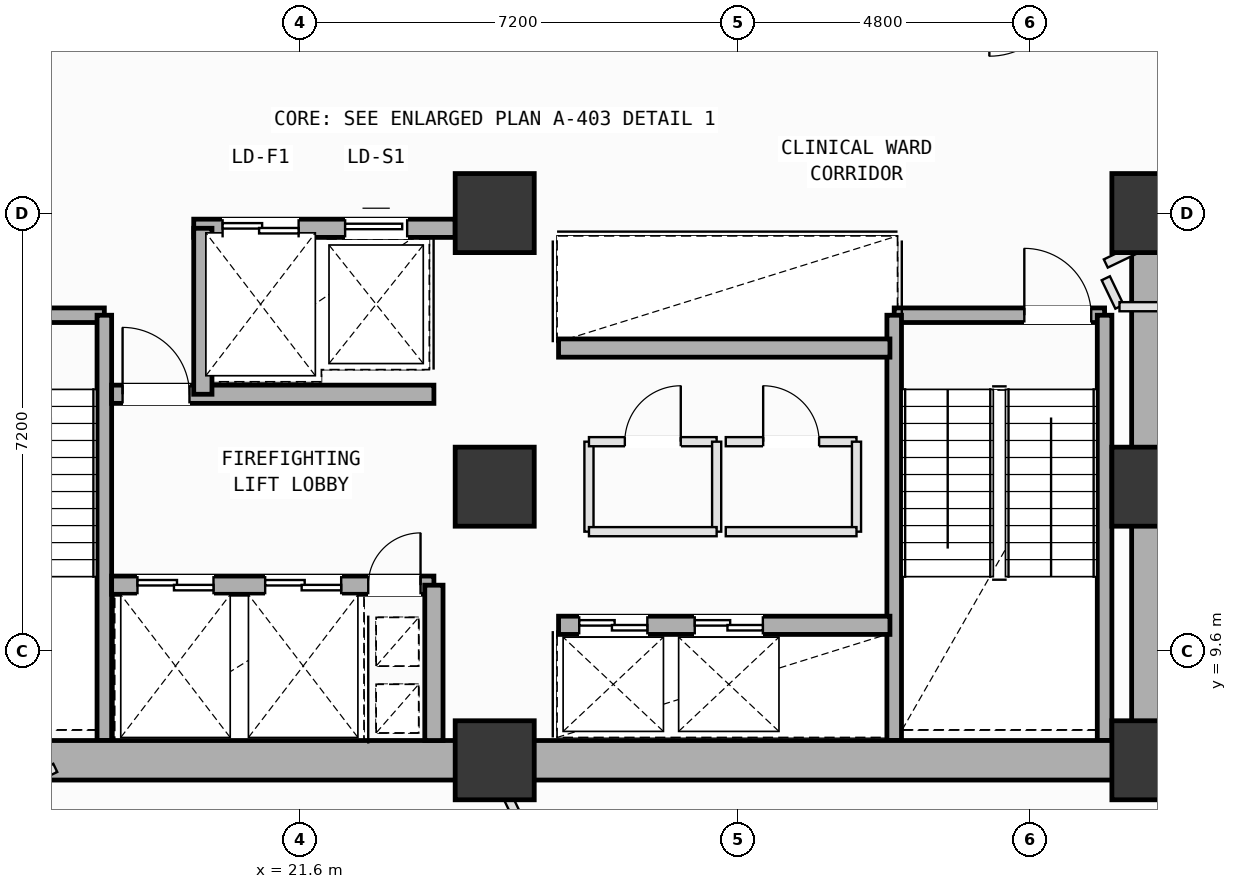
"""IFC4 building model, lengths in metres.
Left out: names, types, materials, properties, quantities, classifications, styles, units other than length and angle.
Written with IfcOpenShell. Run it as: python <this file> out.ifc"""

import sys

from ifc_helpers import new_model, si_unit, direction, frame, frame_2d, origin, origin_2d, place, context, subcontext, project, spatial, rectangle, extrude, element, fill, save


model = new_model("IFC4")
c1 = context("Model", 3, precision=1e-05, world=origin(), true_north=direction((0.0, 1.0)))
c2 = subcontext(c1, "Body", "Model", "MODEL_VIEW")
j1 = project(units=[si_unit("LENGTHUNIT", "METRE"), si_unit("PLANEANGLEUNIT", "RADIAN")], contexts=[c1])
p1 = place(None, origin())
s1 = spatial("IfcSite", under=j1, at=p1, CompositionType="ELEMENT")
p2 = place(p1, origin())
s2 = spatial("IfcBuilding", under=s1, at=p2, CompositionType="ELEMENT")
p3 = place(p2, frame((0.0, 0.0, 132.4)))
s3 = spatial("IfcBuildingStorey", under=s2, at=p3, CompositionType="ELEMENT", Elevation=132.4)
for number, where, z_axis, x_axis in (
    (1, (24.8, 7.8, 0.0), (0.0, 0.0, 1.0), (1.0, 0.0, 0.0)),
    (2, (24.8, 12.3, 0.0), (0.0, 0.0, 1.0), (1.0, 0.0, 0.0)),
    (3, (24.8, 16.8, 0.0), (0.0, 0.0, 1.0), (1.0, 0.0, 0.0)),
    (4, (35.6, 7.8, 0.0), (0.0, 0.0, 1.0), (1.0, 0.0, 0.0)),
    (5, (35.6, 12.3, 0.0), (0.0, 0.0, 1.0), (1.0, 0.0, 0.0)),
    (6, (35.6, 16.8, 0.0), (0.0, 0.0, 1.0), (1.0, 0.0, 0.0)),
):
    element("IfcColumn", number, at=place(p3, frame(where, z_axis=z_axis, x_axis=x_axis)), inside=s3, PredefinedType="COLUMN", context=c2, shape_type="SweptSolid", body=[
        extrude(rectangle(XDim=1.3, YDim=1.3, at=origin_2d()), origin(), (0.0, 0.0, 1.0), 4.0),
    ])
p4 = place(p3, frame((14.92, 15.12, 0.0), z_axis=(0.0, 0.0, 1.0), x_axis=(1.0, 0.0, 0.0)))
e7 = element("IfcWall", 7, at=p4, inside=s3, PredefinedType="SOLIDWALL", context=c2, shape_type="SweptSolid", body=[
    extrude(rectangle(XDim=3.46, YDim=0.24, at=frame_2d((1.73, 0.0))), origin(), (0.0, 0.0, 1.0), 3.78),
])
p5 = place(p4, frame((0.22, 0.0, 0.0)))
e8 = element("IfcOpeningElement", 8, at=p5, cuts=e7, PredefinedType="OPENING", context=c2, shape_type="SweptSolid", body=[
    extrude(rectangle(XDim=1.1, YDim=2.15, at=frame_2d((0.55, 1.075))), frame((0.0, 0.13, 0.0), z_axis=(0.0, -1.0, 0.0), x_axis=(1.0, 0.0, 0.0)), (0.0, 0.0, 1.0), 0.26),
])
p6 = place(p3, frame((18.38, 15.12, 0.0), z_axis=(0.0, 0.0, 1.0), x_axis=(0.0, -1.0, 0.0)))
e9 = element("IfcWall", 9, at=p6, inside=s3, PredefinedType="SOLIDWALL", context=c2, shape_type="SweptSolid", body=[
    extrude(rectangle(XDim=6.995, YDim=0.24, at=frame_2d((3.498, 0.0))), origin(), (0.0, 0.0, 1.0), 3.78),
])
p7 = place(p3, frame((31.37, 15.12, 0.0), z_axis=(0.0, 0.0, 1.0), x_axis=(1.0, 0.0, 0.0)))
e10 = element("IfcWall", 10, at=p7, inside=s3, PredefinedType="SOLIDWALL", context=c2, shape_type="SweptSolid", body=[
    extrude(rectangle(XDim=3.46, YDim=0.24, at=frame_2d((1.73, 0.0))), origin(), (0.0, 0.0, 1.0), 3.78),
])
p8 = place(p7, frame((2.14, 0.0, 0.0)))
e11 = element("IfcOpeningElement", 11, at=p8, cuts=e10, PredefinedType="OPENING", context=c2, shape_type="SweptSolid", body=[
    extrude(rectangle(XDim=1.1, YDim=2.15, at=frame_2d((0.55, 1.075))), frame((0.0, 0.13, 0.0), z_axis=(0.0, -1.0, 0.0), x_axis=(1.0, 0.0, 0.0)), (0.0, 0.0, 1.0), 0.26),
])
for number, where, z_axis, x_axis in (
    (12, (34.83, 15.12, 0.0), (0.0, 0.0, 1.0), (0.0, -1.0, 0.0)),
    (13, (31.37, 8.125, 0.0), (0.0, 0.0, 1.0), (0.0, 1.0, 0.0)),
):
    element("IfcWall", number, at=place(p3, frame(where, z_axis=z_axis, x_axis=x_axis)), inside=s3, PredefinedType="SOLIDWALL", context=c2, shape_type="SweptSolid", body=[
        extrude(rectangle(XDim=6.995, YDim=0.24, at=frame_2d((3.498, 0.0))), origin(), (0.0, 0.0, 1.0), 3.78),
    ])
for number, where, z_axis, x_axis in (
    (14, (14.0, 7.8, 0.0), (0.0, 0.0, 1.0), (1.0, 0.0, 0.0)),
    (15, (24.8, 7.8, 0.0), (0.0, 0.0, 1.0), (1.0, 0.0, 0.0)),
):
    element("IfcWall", number, at=place(p3, frame(where, z_axis=z_axis, x_axis=x_axis)), inside=s3, PredefinedType="SHEAR", context=c2, shape_type="SweptSolid", body=[
        extrude(rectangle(XDim=10.8, YDim=0.65, at=frame_2d((5.4, 0.0))), origin(), (0.0, 0.0, 1.0), 3.78),
    ])
p9 = place(p3, frame((35.6, 7.8, 0.0), z_axis=(0.0, 0.0, 1.0), x_axis=(0.0, 1.0, 0.0)))
e16 = element("IfcWall", 16, at=p9, inside=s3, PredefinedType="SHEAR", context=c2, shape_type="SweptSolid", body=[
    extrude(rectangle(XDim=9.0, YDim=0.65, at=frame_2d((4.5, 0.0))), origin(), (0.0, 0.0, 1.0), 3.78),
])
p10 = place(p3, frame((19.85, 16.55, 0.0), z_axis=(0.0, 0.0, 1.0), x_axis=(1.0, 0.0, 0.0)))
e17 = element("IfcWall", 17, at=p10, inside=s3, PredefinedType="SOLIDWALL", context=c2, shape_type="SweptSolid", body=[
    extrude(rectangle(XDim=4.3, YDim=0.3, at=frame_2d((2.15, 0.0))), origin(), (0.0, 0.0, 1.0), 3.78),
])
p11 = place(p10, frame((0.475, 0.0, 0.0)))
e18 = element("IfcOpeningElement", 18, at=p11, cuts=e17, PredefinedType="OPENING", context=c2, shape_type="SweptSolid", body=[
    extrude(rectangle(XDim=1.25, YDim=2.18, at=frame_2d((0.625, 1.09))), frame((0.0, 0.16, 0.0), z_axis=(0.0, -1.0, 0.0), x_axis=(1.0, 0.0, 0.0)), (0.0, 0.0, 1.0), 0.32),
])
p12 = place(p10, frame((2.49, 0.0, 0.0)))
e19 = element("IfcOpeningElement", 19, at=p12, cuts=e17, PredefinedType="OPENING", context=c2, shape_type="SweptSolid", body=[
    extrude(rectangle(XDim=1.02, YDim=2.12, at=frame_2d((0.51, 1.06))), frame((0.0, 0.16, 0.0), z_axis=(0.0, -1.0, 0.0), x_axis=(1.0, 0.0, 0.0)), (0.0, 0.0, 1.0), 0.32),
])
p13 = place(p3, frame((18.5, 10.68, 0.0), z_axis=(0.0, 0.0, 1.0), x_axis=(1.0, 0.0, 0.0)))
e20 = element("IfcWall", 20, at=p13, inside=s3, PredefinedType="SOLIDWALL", context=c2, shape_type="SweptSolid", body=[
    extrude(rectangle(XDim=5.3, YDim=0.3, at=frame_2d((2.65, 0.0))), origin(), (0.0, 0.0, 1.0), 3.78),
])
p14 = place(p13, frame((4.22, 0.0, 0.0)))
e21 = element("IfcOpeningElement", 21, at=p14, cuts=e20, PredefinedType="OPENING", context=c2, shape_type="SweptSolid", body=[
    extrude(rectangle(XDim=0.86, YDim=2.06, at=frame_2d((0.43, 1.03))), frame((0.0, 0.16, 0.0), z_axis=(0.0, -1.0, 0.0), x_axis=(1.0, 0.0, 0.0)), (0.0, 0.0, 1.0), 0.32),
])
p15 = place(p13, frame((0.425, 0.0, 0.0)))
e22 = element("IfcOpeningElement", 22, at=p15, cuts=e20, PredefinedType="OPENING", context=c2, shape_type="SweptSolid", body=[
    extrude(rectangle(XDim=1.25, YDim=2.18, at=frame_2d((0.625, 1.09))), frame((0.0, 0.16, 0.0), z_axis=(0.0, -1.0, 0.0), x_axis=(1.0, 0.0, 0.0)), (0.0, 0.0, 1.0), 0.32),
])
p16 = place(p13, frame((2.525, 0.0, 0.0)))
e23 = element("IfcOpeningElement", 23, at=p16, cuts=e20, PredefinedType="OPENING", context=c2, shape_type="SweptSolid", body=[
    extrude(rectangle(XDim=1.25, YDim=2.18, at=frame_2d((0.625, 1.09))), frame((0.0, 0.16, 0.0), z_axis=(0.0, -1.0, 0.0), x_axis=(1.0, 0.0, 0.0)), (0.0, 0.0, 1.0), 0.32),
])
p17 = place(p3, frame((18.5, 13.82, 0.0), z_axis=(0.0, 0.0, 1.0), x_axis=(1.0, 0.0, 0.0)))
e24 = element("IfcWall", 24, at=p17, inside=s3, PredefinedType="SOLIDWALL", context=c2, shape_type="SweptSolid", body=[
    extrude(rectangle(XDim=5.3, YDim=0.3, at=frame_2d((2.65, 0.0))), origin(), (0.0, 0.0, 1.0), 3.78),
])
p18 = place(p17, frame((0.18, 0.0, 0.0)))
e25 = element("IfcOpeningElement", 25, at=p18, cuts=e24, PredefinedType="OPENING", context=c2, shape_type="SweptSolid", body=[
    extrude(rectangle(XDim=1.1, YDim=2.15, at=frame_2d((0.55, 1.075))), frame((0.0, 0.16, 0.0), z_axis=(0.0, -1.0, 0.0), x_axis=(1.0, 0.0, 0.0)), (0.0, 0.0, 1.0), 0.32),
])
p19 = place(p3, frame((23.8, 8.125, 0.0), z_axis=(0.0, 0.0, 1.0), x_axis=(0.0, 1.0, 0.0)))
e26 = element("IfcWall", 26, at=p19, inside=s3, PredefinedType="SOLIDWALL", context=c2, shape_type="SweptSolid", body=[
    extrude(rectangle(XDim=2.555, YDim=0.3, at=frame_2d((1.277, 0.0))), origin(), (0.0, 0.0, 1.0), 3.78),
])
p20 = place(p3, frame((20.0, 13.82, 0.0), z_axis=(0.0, 0.0, 1.0), x_axis=(0.0, 1.0, 0.0)))
e27 = element("IfcWall", 27, at=p20, inside=s3, PredefinedType="SOLIDWALL", context=c2, shape_type="SweptSolid", body=[
    extrude(rectangle(XDim=2.73, YDim=0.3, at=frame_2d((1.365, 0.0))), origin(), (0.0, 0.0, 1.0), 3.78),
])
p21 = place(p3, frame((25.85, 10.02, 0.0), z_axis=(0.0, 0.0, 1.0), x_axis=(1.0, 0.0, 0.0)))
e28 = element("IfcWall", 28, at=p21, inside=s3, PredefinedType="SOLIDWALL", context=c2, shape_type="SweptSolid", body=[
    extrude(rectangle(XDim=5.45, YDim=0.3, at=frame_2d((2.725, 0.0))), origin(), (0.0, 0.0, 1.0), 3.78),
])
p22 = place(p21, frame((0.34, 0.0, 0.0)))
e29 = element("IfcOpeningElement", 29, at=p22, cuts=e28, PredefinedType="OPENING", context=c2, shape_type="SweptSolid", body=[
    extrude(rectangle(XDim=1.12, YDim=2.15, at=frame_2d((0.56, 1.075))), frame((0.0, 0.16, 0.0), z_axis=(0.0, -1.0, 0.0), x_axis=(1.0, 0.0, 0.0)), (0.0, 0.0, 1.0), 0.32),
])
p23 = place(p21, frame((2.24, 0.0, 0.0)))
e30 = element("IfcOpeningElement", 30, at=p23, cuts=e28, PredefinedType="OPENING", context=c2, shape_type="SweptSolid", body=[
    extrude(rectangle(XDim=1.12, YDim=2.15, at=frame_2d((0.56, 1.075))), frame((0.0, 0.16, 0.0), z_axis=(0.0, -1.0, 0.0), x_axis=(1.0, 0.0, 0.0)), (0.0, 0.0, 1.0), 0.32),
])
p24 = place(p3, frame((25.85, 14.58, 0.0), z_axis=(0.0, 0.0, 1.0), x_axis=(1.0, 0.0, 0.0)))
e31 = element("IfcWall", 31, at=p24, inside=s3, PredefinedType="SOLIDWALL", context=c2, shape_type="SweptSolid", body=[
    extrude(rectangle(XDim=5.45, YDim=0.3, at=frame_2d((2.725, 0.0))), origin(), (0.0, 0.0, 1.0), 3.78),
])
p25 = place(p3, frame((26.35, 11.56, 0.0), z_axis=(0.0, 0.0, 1.0), x_axis=(0.0, 1.0, 0.0)))
e32 = element("IfcWall", 32, at=p25, inside=s3, PredefinedType="PARTITIONING", context=c2, shape_type="SweptSolid", body=[
    extrude(rectangle(XDim=1.48, YDim=0.15, at=frame_2d((0.74, 0.0))), origin(), (0.0, 0.0, 1.0), 3.78),
])
p26 = place(p3, frame((26.35, 13.04, 0.0), z_axis=(0.0, 0.0, 1.0), x_axis=(1.0, 0.0, 0.0)))
e33 = element("IfcWall", 33, at=p26, inside=s3, PredefinedType="PARTITIONING", context=c2, shape_type="SweptSolid", body=[
    extrude(rectangle(XDim=2.1, YDim=0.15, at=frame_2d((1.05, 0.0))), origin(), (0.0, 0.0, 1.0), 3.78),
])
p27 = place(p26, frame((0.59, 0.0, 0.0)))
e34 = element("IfcOpeningElement", 34, at=p27, cuts=e33, PredefinedType="OPENING", context=c2, shape_type="SweptSolid", body=[
    extrude(rectangle(XDim=0.92, YDim=2.1, at=frame_2d((0.46, 1.05))), frame((0.0, 0.085, 0.0), z_axis=(0.0, -1.0, 0.0), x_axis=(1.0, 0.0, 0.0)), (0.0, 0.0, 1.0), 0.17),
])
p28 = place(p3, frame((28.45, 13.04, 0.0), z_axis=(0.0, 0.0, 1.0), x_axis=(0.0, -1.0, 0.0)))
e35 = element("IfcWall", 35, at=p28, inside=s3, PredefinedType="PARTITIONING", context=c2, shape_type="SweptSolid", body=[
    extrude(rectangle(XDim=1.48, YDim=0.15, at=frame_2d((0.74, 0.0))), origin(), (0.0, 0.0, 1.0), 3.78),
])
p29 = place(p3, frame((28.45, 11.56, 0.0), z_axis=(0.0, 0.0, 1.0), x_axis=(-1.0, 0.0, 0.0)))
e36 = element("IfcWall", 36, at=p29, inside=s3, PredefinedType="PARTITIONING", context=c2, shape_type="SweptSolid", body=[
    extrude(rectangle(XDim=2.1, YDim=0.15, at=frame_2d((1.05, 0.0))), origin(), (0.0, 0.0, 1.0), 3.78),
])
p30 = place(p3, frame((28.6, 13.04, 0.0), z_axis=(0.0, 0.0, 1.0), x_axis=(1.0, 0.0, 0.0)))
e37 = element("IfcWall", 37, at=p30, inside=s3, PredefinedType="PARTITIONING", context=c2, shape_type="SweptSolid", body=[
    extrude(rectangle(XDim=2.15, YDim=0.15, at=frame_2d((1.075, 0.0))), origin(), (0.0, 0.0, 1.0), 3.78),
])
p31 = place(p30, frame((0.615, 0.0, 0.0)))
e38 = element("IfcOpeningElement", 38, at=p31, cuts=e37, PredefinedType="OPENING", context=c2, shape_type="SweptSolid", body=[
    extrude(rectangle(XDim=0.92, YDim=2.1, at=frame_2d((0.46, 1.05))), frame((0.0, 0.085, 0.0), z_axis=(0.0, -1.0, 0.0), x_axis=(1.0, 0.0, 0.0)), (0.0, 0.0, 1.0), 0.17),
])
p32 = place(p3, frame((30.75, 13.04, 0.0), z_axis=(0.0, 0.0, 1.0), x_axis=(0.0, -1.0, 0.0)))
e39 = element("IfcWall", 39, at=p32, inside=s3, PredefinedType="PARTITIONING", context=c2, shape_type="SweptSolid", body=[
    extrude(rectangle(XDim=1.48, YDim=0.15, at=frame_2d((0.74, 0.0))), origin(), (0.0, 0.0, 1.0), 3.78),
])
p33 = place(p3, frame((30.75, 11.56, 0.0), z_axis=(0.0, 0.0, 1.0), x_axis=(-1.0, 0.0, 0.0)))
e40 = element("IfcWall", 40, at=p33, inside=s3, PredefinedType="PARTITIONING", context=c2, shape_type="SweptSolid", body=[
    extrude(rectangle(XDim=2.15, YDim=0.15, at=frame_2d((1.075, 0.0))), origin(), (0.0, 0.0, 1.0), 3.78),
])
p34 = place(p3, frame((12.656, 5.314, 0.0), z_axis=(0.0, 0.0, 1.0), x_axis=(0.901456693358, 0.43286929898, 0.0)))
e41 = element("IfcWall", 41, at=p34, inside=s3, PredefinedType="PARTITIONING", context=c2, shape_type="SweptSolid", body=[
    extrude(rectangle(XDim=5.455, YDim=0.15, at=frame_2d((2.727, 0.0))), origin(), (0.0, 0.0, 1.0), 3.78),
])
p35 = place(p3, frame((24.868, 7.5, 0.0), z_axis=(0.0, 0.0, 1.0), x_axis=(0.43290674934, -0.901438709162, 0.0)))
e42 = element("IfcWall", 42, at=p35, inside=s3, PredefinedType="PARTITIONING", context=c2, shape_type="SweptSolid", body=[
    extrude(rectangle(XDim=10.3, YDim=0.15, at=frame_2d((5.15, 0.0))), origin(), (0.0, 0.0, 1.0), 3.78),
])
p36 = place(p35, frame((4.72, 0.0, 0.0)))
e43 = element("IfcOpeningElement", 43, at=p36, cuts=e42, PredefinedType="OPENING", context=c2, shape_type="SweptSolid", body=[
    extrude(rectangle(XDim=0.86, YDim=2.06, at=frame_2d((0.43, 1.03))), frame((0.0, 0.085, 0.0), z_axis=(0.0, -1.0, 0.0), x_axis=(1.0, 0.0, 0.0)), (0.0, 0.0, 1.0), 0.17),
])
p37 = place(p3, frame((35.6, 7.5, 0.0), z_axis=(0.0, 0.0, 1.0), x_axis=(1.0, 0.0, 0.0)))
e44 = element("IfcWall", 44, at=p37, inside=s3, PredefinedType="PARTITIONING", context=c2, shape_type="SweptSolid", body=[
    extrude(rectangle(XDim=0.55, YDim=0.15, at=frame_2d((0.275, 0.0))), origin(), (0.0, 0.0, 1.0), 2.965),
])
p38 = place(p3, frame((35.075, 15.26, 0.0), z_axis=(0.0, 0.0, 1.0), x_axis=(-0.433052046358, 0.901368917339, 0.0)))
e45 = element("IfcWall", 45, at=p38, inside=s3, PredefinedType="PARTITIONING", context=c2, shape_type="SweptSolid", body=[
    extrude(rectangle(XDim=0.519, YDim=0.15, at=frame_2d((0.26, 0.0))), origin(), (0.0, 0.0, 1.0), 3.78),
])
p39 = place(p3, frame((34.85, 15.971, 0.0), z_axis=(0.0, 0.0, 1.0), x_axis=(0.901463825879, 0.432854445087, 0.0)))
e46 = element("IfcWall", 46, at=p39, inside=s3, PredefinedType="PARTITIONING", context=c2, shape_type="SweptSolid", body=[
    extrude(rectangle(XDim=1.222, YDim=0.15, at=frame_2d((0.611, 0.0))), origin(), (0.0, 0.0, 1.0), 2.945),
])
p40 = place(p3, frame((36.15, 15.26, 0.0), z_axis=(0.0, 0.0, 1.0), x_axis=(-1.0, 0.0, 0.0)))
e47 = element("IfcWall", 47, at=p40, inside=s3, PredefinedType="PARTITIONING", context=c2, shape_type="SweptSolid", body=[
    extrude(rectangle(XDim=1.075, YDim=0.15, at=frame_2d((0.538, 0.0))), origin(), (0.0, 0.0, 1.0), 3.78),
])
p41 = place(p8, origin())
e48 = element("IfcDoor", 48, at=p41, inside=s3, OperationType="SINGLE_SWING_LEFT", PredefinedType="DOOR", context=c2, shape_type="SweptSolid", body=[
    extrude(rectangle(XDim=1.1, YDim=2.15, at=frame_2d((0.55, 1.075))), frame((0.0, 0.025, 0.0), z_axis=(0.0, -1.0, 0.0), x_axis=(1.0, 0.0, 0.0)), (0.0, 0.0, 1.0), 0.05),
])
fill(e11, e48)
p42 = place(p14, origin())
e49 = element("IfcDoor", 49, at=p42, inside=s3, OperationType="SINGLE_SWING_RIGHT", PredefinedType="DOOR", context=c2, shape_type="SweptSolid", body=[
    extrude(rectangle(XDim=0.86, YDim=2.06, at=frame_2d((0.43, 1.03))), frame((0.0, 0.025, 0.0), z_axis=(0.0, -1.0, 0.0), x_axis=(1.0, 0.0, 0.0)), (0.0, 0.0, 1.0), 0.05),
])
fill(e21, e49)
p43 = place(p18, origin())
e50 = element("IfcDoor", 50, at=p43, inside=s3, OperationType="SINGLE_SWING_LEFT", PredefinedType="DOOR", context=c2, shape_type="SweptSolid", body=[
    extrude(rectangle(XDim=1.1, YDim=2.15, at=frame_2d((0.55, 1.075))), frame((0.0, 0.025, 0.0), z_axis=(0.0, -1.0, 0.0), x_axis=(1.0, 0.0, 0.0)), (0.0, 0.0, 1.0), 0.05),
])
fill(e25, e50)
p44 = place(p15, origin())
e51 = element("IfcDoor", 51, at=p44, inside=s3, OperationType="DOUBLE_DOOR_SLIDING", PredefinedType="DOOR", context=c2, shape_type="SweptSolid", body=[
    extrude(rectangle(XDim=1.25, YDim=2.18, at=frame_2d((0.625, 1.09))), frame((0.0, 0.025, 0.0), z_axis=(0.0, -1.0, 0.0), x_axis=(1.0, 0.0, 0.0)), (0.0, 0.0, 1.0), 0.05),
])
fill(e22, e51)
p45 = place(p16, origin())
e52 = element("IfcDoor", 52, at=p45, inside=s3, OperationType="DOUBLE_DOOR_SLIDING", PredefinedType="DOOR", context=c2, shape_type="SweptSolid", body=[
    extrude(rectangle(XDim=1.25, YDim=2.18, at=frame_2d((0.625, 1.09))), frame((0.0, 0.025, 0.0), z_axis=(0.0, -1.0, 0.0), x_axis=(1.0, 0.0, 0.0)), (0.0, 0.0, 1.0), 0.05),
])
fill(e23, e52)
p46 = place(p22, origin())
e53 = element("IfcDoor", 53, at=p46, inside=s3, OperationType="DOUBLE_DOOR_SLIDING", PredefinedType="DOOR", context=c2, shape_type="SweptSolid", body=[
    extrude(rectangle(XDim=1.12, YDim=2.15, at=frame_2d((0.56, 1.075))), frame((0.0, 0.025, 0.0), z_axis=(0.0, -1.0, 0.0), x_axis=(1.0, 0.0, 0.0)), (0.0, 0.0, 1.0), 0.05),
])
fill(e29, e53)
p47 = place(p23, origin())
e54 = element("IfcDoor", 54, at=p47, inside=s3, OperationType="DOUBLE_DOOR_SLIDING", PredefinedType="DOOR", context=c2, shape_type="SweptSolid", body=[
    extrude(rectangle(XDim=1.12, YDim=2.15, at=frame_2d((0.56, 1.075))), frame((0.0, 0.025, 0.0), z_axis=(0.0, -1.0, 0.0), x_axis=(1.0, 0.0, 0.0)), (0.0, 0.0, 1.0), 0.05),
])
fill(e30, e54)
p48 = place(p11, origin())
e55 = element("IfcDoor", 55, at=p48, inside=s3, OperationType="DOUBLE_DOOR_SLIDING", PredefinedType="DOOR", context=c2, shape_type="SweptSolid", body=[
    extrude(rectangle(XDim=1.25, YDim=2.18, at=frame_2d((0.625, 1.09))), frame((0.0, 0.025, 0.0), z_axis=(0.0, -1.0, 0.0), x_axis=(1.0, 0.0, 0.0)), (0.0, 0.0, 1.0), 0.05),
])
fill(e18, e55)
p49 = place(p12, origin())
e56 = element("IfcDoor", 56, at=p49, inside=s3, OperationType="SLIDING_TO_LEFT", PredefinedType="DOOR", context=c2, shape_type="SweptSolid", body=[
    extrude(rectangle(XDim=1.02, YDim=2.12, at=frame_2d((0.51, 1.06))), frame((0.0, 0.025, 0.0), z_axis=(0.0, -1.0, 0.0), x_axis=(1.0, 0.0, 0.0)), (0.0, 0.0, 1.0), 0.05),
])
fill(e19, e56)
p50 = place(p27, origin())
e57 = element("IfcDoor", 57, at=p50, inside=s3, OperationType="SINGLE_SWING_RIGHT", PredefinedType="DOOR", context=c2, shape_type="SweptSolid", body=[
    extrude(rectangle(XDim=0.92, YDim=2.1, at=frame_2d((0.46, 1.05))), frame((0.0, 0.025, 0.0), z_axis=(0.0, -1.0, 0.0), x_axis=(1.0, 0.0, 0.0)), (0.0, 0.0, 1.0), 0.05),
])
fill(e34, e57)
p51 = place(p31, origin())
e58 = element("IfcDoor", 58, at=p51, inside=s3, OperationType="SINGLE_SWING_LEFT", PredefinedType="DOOR", context=c2, shape_type="SweptSolid", body=[
    extrude(rectangle(XDim=0.92, YDim=2.1, at=frame_2d((0.46, 1.05))), frame((0.0, 0.025, 0.0), z_axis=(0.0, -1.0, 0.0), x_axis=(1.0, 0.0, 0.0)), (0.0, 0.0, 1.0), 0.05),
])
fill(e38, e58)
save(model, sys.argv[1])
